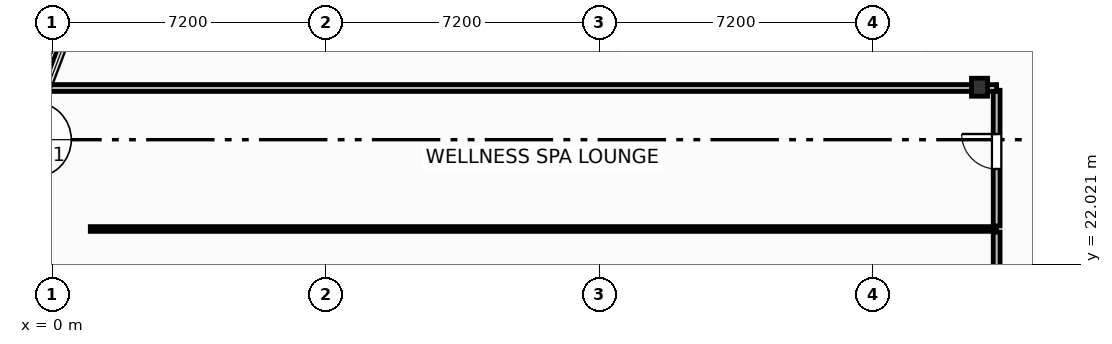
"""IFC4 building model, lengths in metres.
Left out: names, types, materials, properties, quantities, classifications, styles, units other than length and angle.
Written with IfcOpenShell. Run it as: python <this file> out.ifc"""

import sys

from ifc_helpers import new_model, si_unit, direction, frame, frame_2d, origin, origin_2d, place, context, subcontext, project, spatial, rectangle, i_section, extrude, element, fill, save


model = new_model("IFC4")
c1 = context("Model", 3, precision=1e-05, world=origin(), true_north=direction((0.0, 1.0)))
c2 = subcontext(c1, "Body", "Model", "MODEL_VIEW")
j1 = project(units=[si_unit("LENGTHUNIT", "METRE"), si_unit("PLANEANGLEUNIT", "RADIAN")], contexts=[c1])
p1 = place(None, origin())
s1 = spatial("IfcSite", under=j1, at=p1, CompositionType="ELEMENT")
p2 = place(p1, origin())
s2 = spatial("IfcBuilding", under=s1, at=p2, CompositionType="ELEMENT")
p3 = place(p2, frame((0.0, 0.0, 98.4)))
s3 = spatial("IfcBuildingStorey", under=s2, at=p3, CompositionType="ELEMENT", Elevation=98.4)
p4 = place(p3, frame((24.4, 26.68, 0.0), z_axis=(0.0, 0.0, 1.0), x_axis=(1.0, 0.0, 0.0)))
e1 = element("IfcColumn", 1, at=p4, inside=s3, PredefinedType="COLUMN", context=c2, shape_type="SweptSolid", body=[
    extrude(i_section(OverallWidth=0.424, OverallDepth=0.474, WebThickness=0.048, FlangeThickness=0.077, FilletRadius=0.025, at=origin_2d()), origin(), (0.0, 0.0, 1.0), 3.7),
])
p5 = place(p3, frame((24.85, 19.3, 0.0), z_axis=(0.0, 0.0, 1.0), x_axis=(0.0, 1.0, 0.0)))
e2 = element("IfcWall", 2, at=p5, inside=s3, PredefinedType="PARTITIONING", context=c2, shape_type="SweptSolid", body=[
    extrude(rectangle(XDim=3.57, YDim=0.18, at=frame_2d((1.785, 0.0))), origin(), (0.0, 0.0, 1.0), 3.45),
])
p6 = place(p5, frame((1.5, 0.0, 0.0)))
e3 = element("IfcOpeningElement", 3, at=p6, cuts=e2, PredefinedType="OPENING", context=c2, shape_type="SweptSolid", body=[
    extrude(rectangle(XDim=0.92, YDim=2.05, at=frame_2d((0.46, 1.025))), frame((0.0, 0.1, 0.0), z_axis=(0.0, -1.0, 0.0), x_axis=(1.0, 0.0, 0.0)), (0.0, 0.0, 1.0), 0.2),
])
p7 = place(p3, frame((24.85, 23.03, 0.0), z_axis=(0.0, 0.0, 1.0), x_axis=(0.0, 1.0, 0.0)))
e4 = element("IfcWall", 4, at=p7, inside=s3, PredefinedType="PARTITIONING", context=c2, shape_type="SweptSolid", body=[
    extrude(rectangle(XDim=3.57, YDim=0.18, at=frame_2d((1.785, 0.0))), origin(), (0.0, 0.0, 1.0), 3.45),
])
p8 = place(p7, frame((1.5, 0.0, 0.0)))
e5 = element("IfcOpeningElement", 5, at=p8, cuts=e4, PredefinedType="OPENING", context=c2, shape_type="SweptSolid", body=[
    extrude(rectangle(XDim=0.92, YDim=2.05, at=frame_2d((0.46, 1.025))), frame((0.0, 0.1, 0.0), z_axis=(0.0, -1.0, 0.0), x_axis=(1.0, 0.0, 0.0)), (0.0, 0.0, 1.0), 0.2),
])
p9 = place(p3, frame((1.0, 22.95, 0.0), z_axis=(0.0, 0.0, 1.0), x_axis=(1.0, 0.0, 0.0)))
e6 = element("IfcWall", 6, at=p9, inside=s3, PredefinedType="PARTITIONING", context=c2, shape_type="SweptSolid", body=[
    extrude(rectangle(XDim=23.85, YDim=0.125, at=frame_2d((11.925, 0.0))), origin(), (0.0, 0.0, 1.0), 3.45),
])
p10 = place(p3, frame((-0.086, 26.66, 0.0), z_axis=(0.0, 0.0, 1.0), x_axis=(1.0, 0.0, 0.0)))
e7 = element("IfcWall", 7, at=p10, inside=s3, PredefinedType="PARTITIONING", context=c2, shape_type="SweptSolid", body=[
    extrude(rectangle(XDim=24.936, YDim=0.18, at=frame_2d((12.468, 0.0))), origin(), (0.0, 0.0, 1.0), 2.662),
])
p11 = place(p8, origin())
e8 = element("IfcDoor", 8, at=p11, inside=s3, OperationType="SINGLE_SWING_RIGHT", PredefinedType="DOOR", context=c2, shape_type="SweptSolid", body=[
    extrude(rectangle(XDim=0.92, YDim=2.05, at=frame_2d((0.46, 1.025))), frame((0.0, 0.025, 0.0), z_axis=(0.0, -1.0, 0.0), x_axis=(1.0, 0.0, 0.0)), (0.0, 0.0, 1.0), 0.05),
])
fill(e5, e8)
save(model, sys.argv[1])
